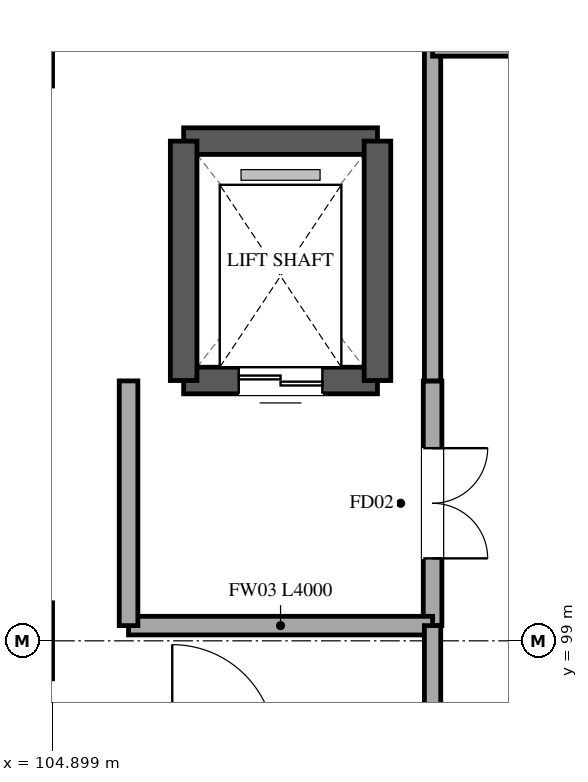
"""IFC4 building model, lengths in metres.
Left out: names, types, materials, properties, quantities, classifications, styles, units other than length and angle.
Written with IfcOpenShell. Run it as: python <this file> out.ifc"""

import sys

from ifc_helpers import new_model, si_unit, direction, frame, frame_2d, origin, place, context, subcontext, project, spatial, rectangle, extrude, element, fill, save


model = new_model("IFC4")
c1 = context("Model", 3, precision=1e-05, world=origin(), true_north=direction((0.0, 1.0)))
c2 = subcontext(c1, "Body", "Model", "MODEL_VIEW")
j1 = project(units=[si_unit("LENGTHUNIT", "METRE"), si_unit("PLANEANGLEUNIT", "RADIAN")], contexts=[c1])
p1 = place(None, origin())
s1 = spatial("IfcSite", under=j1, at=p1, CompositionType="ELEMENT")
p2 = place(p1, origin())
s2 = spatial("IfcBuilding", under=s1, at=p2, CompositionType="ELEMENT")
p3 = place(p2, frame((0.0, 0.0, 6.0)))
s3 = spatial("IfcBuildingStorey", under=s2, at=p3, CompositionType="ELEMENT", Elevation=6.0)
p4 = place(p3, frame((106.625, 105.575, 0.0), z_axis=(0.0, 0.0, 1.0), x_axis=(1.0, 0.0, 0.0)))
e1 = element("IfcWall", 1, at=p4, inside=s3, PredefinedType="SHEAR", context=c2, shape_type="SweptSolid", body=[
    extrude(rectangle(XDim=2.55, YDim=0.35, at=frame_2d((1.275, 0.0))), origin(), (0.0, 0.0, 1.0), 5.4),
])
p5 = place(p3, frame((109.175, 102.425, 0.0), z_axis=(0.0, 0.0, 1.0), x_axis=(-1.0, 0.0, 0.0)))
e2 = element("IfcWall", 2, at=p5, inside=s3, PredefinedType="SHEAR", context=c2, shape_type="SweptSolid", body=[
    extrude(rectangle(XDim=2.55, YDim=0.35, at=frame_2d((1.275, 0.0))), origin(), (0.0, 0.0, 1.0), 5.4),
])
p6 = place(p5, frame((0.725, 0.0, 0.0)))
e3 = element("IfcOpeningElement", 3, at=p6, cuts=e2, PredefinedType="OPENING", context=c2, shape_type="SweptSolid", body=[
    extrude(rectangle(XDim=1.1, YDim=2.2, at=frame_2d((0.55, 1.1))), frame((0.0, 0.185, 0.0), z_axis=(0.0, -1.0, 0.0), x_axis=(1.0, 0.0, 0.0)), (0.0, 0.0, 1.0), 0.37),
])
for number, where, z_axis, x_axis in (
    (4, (106.625, 102.425, 0.0), (0.0, 0.0, 1.0), (0.0, 1.0, 0.0)),
    (5, (109.175, 105.575, 0.0), (0.0, 0.0, 1.0), (0.0, -1.0, 0.0)),
):
    element("IfcWall", number, at=place(p3, frame(where, z_axis=z_axis, x_axis=x_axis)), inside=s3, PredefinedType="SHEAR", context=c2, shape_type="SweptSolid", body=[
        extrude(rectangle(XDim=3.15, YDim=0.35, at=frame_2d((1.575, 0.0))), origin(), (0.0, 0.0, 1.0), 5.4),
    ])
p7 = place(p3, frame((109.9, 102.42, 0.0), z_axis=(0.0, 0.0, 1.0), x_axis=(0.0, -1.0, 0.0)))
e6 = element("IfcWall", 6, at=p7, inside=s3, PredefinedType="STANDARD", context=c2, shape_type="SweptSolid", body=[
    extrude(rectangle(XDim=3.22, YDim=0.245, at=frame_2d((1.61, 0.0))), origin(), (0.0, 0.0, 1.0), 4.325),
])
p8 = place(p7, frame((0.885, 0.0, 0.0)))
e7 = element("IfcOpeningElement", 7, at=p8, cuts=e6, PredefinedType="OPENING", context=c2, shape_type="SweptSolid", body=[
    extrude(rectangle(XDim=1.45, YDim=2.2, at=frame_2d((0.725, 1.1))), frame((0.0, 0.133, 0.0), z_axis=(0.0, -1.0, 0.0), x_axis=(1.0, 0.0, 0.0)), (0.0, 0.0, 1.0), 0.265),
])
p9 = place(p3, frame((109.9, 99.2, 0.0), z_axis=(0.0, 0.0, 1.0), x_axis=(-1.0, 0.0, 0.0)))
e8 = element("IfcWall", 8, at=p9, inside=s3, PredefinedType="STANDARD", context=c2, shape_type="SweptSolid", body=[
    extrude(rectangle(XDim=4.0, YDim=0.245, at=frame_2d((2.0, 0.0))), origin(), (0.0, 0.0, 1.0), 4.325),
])
p10 = place(p3, frame((105.9, 99.2, 0.0), z_axis=(0.0, 0.0, 1.0), x_axis=(0.0, 1.0, 0.0)))
e9 = element("IfcWall", 9, at=p10, inside=s3, PredefinedType="STANDARD", context=c2, shape_type="SweptSolid", body=[
    extrude(rectangle(XDim=3.22, YDim=0.245, at=frame_2d((1.61, 0.0))), origin(), (0.0, 0.0, 1.0), 4.325),
])
p11 = place(p3, frame((109.9, 97.6, 0.0), z_axis=(0.0, 0.0, 1.0), x_axis=(0.0, 1.0, 0.0)))
e10 = element("IfcWall", 10, at=p11, inside=s3, PredefinedType="PARTITIONING", context=c2, shape_type="SweptSolid", body=[
    extrude(rectangle(XDim=1.6, YDim=0.215, at=frame_2d((0.8, 0.0))), origin(), (0.0, 0.0, 1.0), 4.325),
])
p12 = place(p3, frame((109.9, 102.42, 0.0), z_axis=(0.0, 0.0, 1.0), x_axis=(0.0, 1.0, 0.0)))
e11 = element("IfcWall", 11, at=p12, inside=s3, PredefinedType="PARTITIONING", context=c2, shape_type="SweptSolid", body=[
    extrude(rectangle(XDim=4.38, YDim=0.215, at=frame_2d((2.19, 0.0))), origin(), (0.0, 0.0, 1.0), 4.325),
])
p13 = place(p3, frame((109.9, 106.8, 0.0), z_axis=(0.0, 0.0, 1.0), x_axis=(1.0, 0.0, 0.0)))
e12 = element("IfcWall", 12, at=p13, inside=s3, PredefinedType="PARTITIONING", context=c2, shape_type="SweptSolid", body=[
    extrude(rectangle(XDim=2.69, YDim=0.215, at=frame_2d((1.345, 0.0))), origin(), (0.0, 0.0, 1.0), 4.325),
])
p14 = place(p6, origin())
e13 = element("IfcDoor", 13, at=p14, inside=s3, OperationType="DOUBLE_DOOR_SLIDING", PredefinedType="DOOR", context=c2, shape_type="SweptSolid", body=[
    extrude(rectangle(XDim=1.1, YDim=2.2, at=frame_2d((0.55, 1.1))), frame((0.0, 0.025, 0.0), z_axis=(0.0, -1.0, 0.0), x_axis=(1.0, 0.0, 0.0)), (0.0, 0.0, 1.0), 0.05),
])
fill(e3, e13)
p15 = place(p8, origin())
e14 = element("IfcDoor", 14, at=p15, inside=s3, OperationType="DOUBLE_DOOR_SINGLE_SWING", PredefinedType="DOOR", context=c2, shape_type="SweptSolid", body=[
    extrude(rectangle(XDim=1.45, YDim=2.2, at=frame_2d((0.725, 1.1))), frame((0.0, 0.025, 0.0), z_axis=(0.0, -1.0, 0.0), x_axis=(1.0, 0.0, 0.0)), (0.0, 0.0, 1.0), 0.05),
])
fill(e7, e14)
save(model, sys.argv[1])
